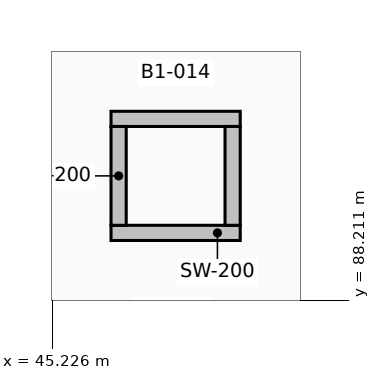
"""IFC4 building model, lengths in metres.
Left out: names, types, materials, properties, quantities, classifications, styles, units other than length and angle.
Written with IfcOpenShell. Run it as: python <this file> out.ifc"""

import sys

from ifc_helpers import new_model, si_unit, direction, frame, frame_2d, origin, place, context, subcontext, project, spatial, rectangle, extrude, element, save


model = new_model("IFC4")
c1 = context("Model", 3, precision=1e-05, world=origin(), true_north=direction((0.0, 1.0)))
c2 = subcontext(c1, "Body", "Model", "MODEL_VIEW")
j1 = project(units=[si_unit("LENGTHUNIT", "METRE"), si_unit("PLANEANGLEUNIT", "RADIAN")], contexts=[c1])
p1 = place(None, origin())
s1 = spatial("IfcSite", under=j1, at=p1, CompositionType="ELEMENT")
p2 = place(p1, origin())
s2 = spatial("IfcBuilding", under=s1, at=p2, CompositionType="ELEMENT")
p3 = place(p2, frame((0.0, 0.0, -4.8)))
s3 = spatial("IfcBuildingStorey", under=s2, at=p3, CompositionType="ELEMENT", Elevation=-4.8)
for number, where, z_axis, x_axis in (
    (1, (46.0, 89.1, 0.0), (0.0, 0.0, 1.0), (1.0, 0.0, 0.0)),
    (2, (47.7, 90.6, 0.0), (0.0, 0.0, 1.0), (-1.0, 0.0, 0.0)),
):
    element("IfcWall", number, at=place(p3, frame(where, z_axis=z_axis, x_axis=x_axis)), inside=s3, PredefinedType="PARTITIONING", context=c2, shape_type="SweptSolid", body=[
        extrude(rectangle(XDim=1.7, YDim=0.2, at=frame_2d((0.85, 0.0))), origin(), (0.0, 0.0, 1.0), 4.5),
    ])
for number, where, z_axis, x_axis in (
    (3, (46.1, 89.2, 0.0), (0.0, 0.0, 1.0), (0.0, 1.0, 0.0)),
    (4, (47.6, 90.5, 0.0), (0.0, 0.0, 1.0), (0.0, -1.0, 0.0)),
):
    element("IfcWall", number, at=place(p3, frame(where, z_axis=z_axis, x_axis=x_axis)), inside=s3, PredefinedType="PARTITIONING", context=c2, shape_type="SweptSolid", body=[
        extrude(rectangle(XDim=1.3, YDim=0.2, at=frame_2d((0.65, 0.0))), origin(), (0.0, 0.0, 1.0), 4.5),
    ])
save(model, sys.argv[1])
